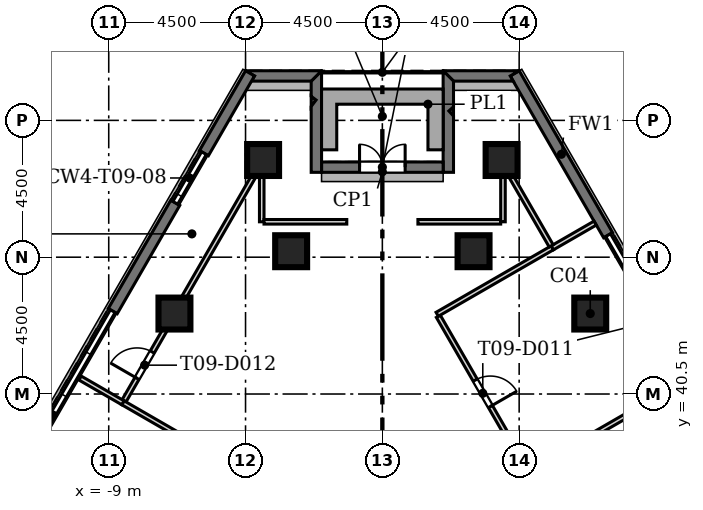
"""IFC4 building model, lengths in metres.
Left out: names, types, materials, properties, quantities, classifications, styles, units other than length and angle.
Written with IfcOpenShell. Run it as: python <this file> out.ifc"""

import sys

from ifc_helpers import new_model, si_unit, direction, frame, frame_2d, origin, origin_2d, place, context, subcontext, project, spatial, polyline, rectangle, outline, extrude, element, fill, save


model = new_model("IFC4")
c1 = context("Model", 3, precision=1e-05, world=origin(), true_north=direction((0.0, 1.0)))
c2 = subcontext(c1, "Body", "Model", "MODEL_VIEW")
j1 = project(units=[si_unit("LENGTHUNIT", "METRE"), si_unit("PLANEANGLEUNIT", "RADIAN")], contexts=[c1])
p1 = place(None, origin())
s1 = spatial("IfcSite", under=j1, at=p1, CompositionType="ELEMENT")
p2 = place(p1, origin())
s2 = spatial("IfcBuilding", under=s1, at=p2, CompositionType="ELEMENT")
p3 = place(p2, frame((0.0, 0.0, 137.5)))
s3 = spatial("IfcBuildingStorey", under=s2, at=p3, CompositionType="ELEMENT", Elevation=137.5)
for number, where, z_axis, x_axis in (
    (1, (6.838, 43.146, 0.0), (0.0, 0.0, 1.0), (1.0, 0.0, 0.0)),
    (2, (3.923, 48.197, 0.0), (0.0, 0.0, 1.0), (1.0, 0.0, 0.0)),
    (3, (3.0, 45.197, 0.0), (0.0, 0.0, 1.0), (1.0, 0.0, 0.0)),
    (4, (-3.0, 45.197, 0.0), (0.0, 0.0, 1.0), (1.0, 0.0, 0.0)),
    (5, (-3.923, 48.197, 0.0), (0.0, 0.0, 1.0), (1.0, 0.0, 0.0)),
    (6, (-6.838, 43.146, 0.0), (0.0, 0.0, 1.0), (1.0, 0.0, 0.0)),
):
    element("IfcColumn", number, at=place(p3, frame(where, z_axis=z_axis, x_axis=x_axis)), inside=s3, PredefinedType="COLUMN", context=c2, shape_type="SweptSolid", body=[
        extrude(rectangle(XDim=1.05, YDim=1.05, at=origin_2d()), origin(), (0.0, 0.0, 1.0), 5.4),
    ])
p4 = place(p3, frame((7.426, 45.724, 0.0), z_axis=(0.0, 0.0, 1.0), x_axis=(-0.500018155671, 0.866014921349, 0.0)))
e7 = element("IfcWall", 7, at=p4, inside=s3, PredefinedType="SOLIDWALL", context=c2, shape_type="SweptSolid", body=[
    extrude(rectangle(XDim=6.146, YDim=0.34, at=frame_2d((3.073, 0.0))), origin(), (0.0, 0.0, 1.0), 5.0),
])
p5 = place(p3, origin())
e8 = element("IfcWall", 8, at=p5, inside=s3, PredefinedType="SOLIDWALL", context=c2, shape_type="SweptSolid", body=[
    extrude(outline(polyline([(1.999, 51.132), (4.501, 51.132), (4.501, 51.132), (4.206, 50.961), (4.305, 50.791), (2.34, 50.791), (1.999, 51.132), (1.999, 51.132)])), origin(), (0.0, 0.0, 1.0), 5.0),
])
p6 = place(p3, origin())
e9 = element("IfcWall", 9, at=p6, inside=s3, PredefinedType="SOLIDWALL", context=c2, shape_type="SweptSolid", body=[
    extrude(outline(polyline([(2.341, 49.642), (2.188, 49.81), (2.341, 49.948), (2.341, 49.642)])), origin(), (0.0, 0.0, 1.0), 4.4),
])
p7 = place(p3, origin())
e10 = element("IfcWall", 10, at=p7, inside=s3, PredefinedType="SOLIDWALL", context=c2, shape_type="SweptSolid", body=[
    extrude(outline(polyline([(2.0, 47.791), (2.0, 51.133), (2.0, 51.133), (2.341, 50.792), (2.341, 49.948), (2.188, 49.81), (2.341, 49.642), (2.341, 47.791), (2.0, 47.791)])), origin(), (0.0, 0.0, 1.0), 5.0),
])
p8 = place(p3, frame((2.0, 47.962, 0.0), z_axis=(0.0, 0.0, 1.0), x_axis=(-1.0, 0.0, 0.0)))
e11 = element("IfcWall", 11, at=p8, inside=s3, PredefinedType="SOLIDWALL", context=c2, shape_type="SweptSolid", body=[
    extrude(rectangle(XDim=4.0, YDim=0.34, at=frame_2d((2.0, 0.0))), origin(), (0.0, 0.0, 1.0), 5.0),
])
p9 = place(p8, frame((1.25, 0.0, 0.0)))
e12 = element("IfcOpeningElement", 12, at=p9, cuts=e11, PredefinedType="OPENING", context=c2, shape_type="SweptSolid", body=[
    extrude(rectangle(XDim=1.5, YDim=2.4, at=frame_2d((0.75, 1.2))), frame((0.0, 0.18, 0.0), z_axis=(0.0, -1.0, 0.0), x_axis=(1.0, 0.0, 0.0)), (0.0, 0.0, 1.0), 0.36),
])
p10 = place(p3, origin())
e13 = element("IfcWall", 13, at=p10, inside=s3, PredefinedType="SOLIDWALL", context=c2, shape_type="SweptSolid", body=[
    extrude(outline(polyline([(-2.341, 50.292), (-2.18, 50.171), (-2.341, 49.959), (-2.341, 50.292)])), origin(), (0.0, 0.0, 1.0), 4.4),
])
p11 = place(p3, origin())
e14 = element("IfcWall", 14, at=p11, inside=s3, PredefinedType="SOLIDWALL", context=c2, shape_type="SweptSolid", body=[
    extrude(outline(polyline([(-2.0, 47.791), (-2.341, 47.791), (-2.341, 49.959), (-2.18, 50.171), (-2.341, 50.292), (-2.341, 50.792), (-2.0, 51.133), (-2.0, 51.133), (-2.0, 47.791)])), origin(), (0.0, 0.0, 1.0), 5.0),
])
p12 = place(p3, origin())
e15 = element("IfcWall", 15, at=p12, inside=s3, PredefinedType="SOLIDWALL", context=c2, shape_type="SweptSolid", body=[
    extrude(outline(polyline([(-4.305, 50.791), (-4.206, 50.961), (-4.501, 51.132), (-4.501, 51.132), (-1.999, 51.132), (-1.999, 51.132), (-2.34, 50.791), (-4.305, 50.791)])), origin(), (0.0, 0.0, 1.0), 5.0),
])
p13 = place(p3, frame((-4.353, 51.047, 0.0), z_axis=(0.0, 0.0, 1.0), x_axis=(-0.499985053252, -0.866034033121, 0.0)))
e16 = element("IfcWall", 16, at=p13, inside=s3, PredefinedType="SOLIDWALL", context=c2, shape_type="SweptSolid", body=[
    extrude(rectangle(XDim=3.031, YDim=0.34, at=frame_2d((1.516, 0.0))), origin(), (0.0, 0.0, 1.0), 5.0),
])
p14 = place(p3, frame((-6.811, 46.789, 0.0), z_axis=(0.0, 0.0, 1.0), x_axis=(-0.499974107589, -0.866040352259, 0.0)))
e17 = element("IfcWall", 17, at=p14, inside=s3, PredefinedType="SOLIDWALL", context=c2, shape_type="SweptSolid", body=[
    extrude(rectangle(XDim=4.115, YDim=0.34, at=frame_2d((2.058, 0.0))), origin(), (0.0, 0.0, 1.0), 5.0),
])
p15 = place(p3, origin())
e18 = element("IfcWall", 18, at=p15, inside=s3, PredefinedType="USERDEFINED", context=c2, shape_type="SweptSolid", body=[
    extrude(outline(polyline([(-1.5, 50.532), (-2.0, 50.532), (-2.0, 50.032), (-2.0, 48.532), (-1.5, 48.532), (-1.5, 50.032), (1.5, 50.032), (1.5, 48.532), (2.0, 48.532), (2.0, 50.032), (2.0, 50.532), (1.5, 50.532), (-1.5, 50.532)])), origin(), (0.0, 0.0, 1.0), 1.1),
])
p16 = place(p3, frame((4.804, 37.925, 0.0), z_axis=(0.0, 0.0, 1.0), x_axis=(0.866031096941, 0.499990139034, 0.0)))
e19 = element("IfcWall", 19, at=p16, inside=s3, PredefinedType="PARTITIONING", context=c2, shape_type="SweptSolid", body=[
    extrude(rectangle(XDim=6.0, YDim=0.15, at=frame_2d((3.0, 0.0))), origin(), (0.0, 0.0, 1.0), 5.0),
])
p17 = place(p3, frame((4.766, 37.99, 0.0), z_axis=(0.0, 0.0, 1.0), x_axis=(-0.500012662943, 0.866018092707, 0.0)))
e20 = element("IfcWall", 20, at=p17, inside=s3, PredefinedType="PARTITIONING", context=c2, shape_type="SweptSolid", body=[
    extrude(rectangle(XDim=5.85, YDim=0.15, at=frame_2d((2.925, 0.0))), origin(), (0.0, 0.0, 1.0), 5.0),
])
p18 = place(p17, frame((2.425, 0.0, 0.0)))
e21 = element("IfcOpeningElement", 21, at=p18, cuts=e20, PredefinedType="OPENING", context=c2, shape_type="SweptSolid", body=[
    extrude(rectangle(XDim=1.0, YDim=2.1, at=frame_2d((0.5, 1.05))), frame((0.0, 0.085, 0.0), z_axis=(0.0, -1.0, 0.0), x_axis=(1.0, 0.0, 0.0)), (0.0, 0.0, 1.0), 0.17),
])
p19 = place(p3, frame((1.804, 43.122, 0.0), z_axis=(0.0, 0.0, 1.0), x_axis=(0.866032173762, 0.499988273872, 0.0)))
e22 = element("IfcWall", 22, at=p19, inside=s3, PredefinedType="PARTITIONING", context=c2, shape_type="SweptSolid", body=[
    extrude(rectangle(XDim=4.373, YDim=0.15, at=frame_2d((2.186, 0.0))), origin(), (0.0, 0.0, 1.0), 5.0),
])
p20 = place(p3, frame((5.591, 45.308, 0.0), z_axis=(0.0, 0.0, 1.0), x_axis=(0.866028203713, 0.499995150351, 0.0)))
e23 = element("IfcWall", 23, at=p20, inside=s3, PredefinedType="PARTITIONING", context=c2, shape_type="SweptSolid", body=[
    extrude(rectangle(XDim=1.627, YDim=0.15, at=frame_2d((0.814, 0.0))), origin(), (0.0, 0.0, 1.0), 5.0),
])
p21 = place(p3, frame((-8.496, 40.276, 0.0), z_axis=(0.0, 0.0, 1.0), x_axis=(0.500037236202, 0.866003904386, 0.0)))
e24 = element("IfcWall", 24, at=p21, inside=s3, PredefinedType="PARTITIONING", context=c2, shape_type="SweptSolid", body=[
    extrude(rectangle(XDim=2.708, YDim=0.15, at=frame_2d((1.354, 0.0))), origin(), (0.0, 0.0, 1.0), 4.2),
])
p22 = place(p21, frame((0.854, 0.0, 0.0)))
e25 = element("IfcOpeningElement", 25, at=p22, cuts=e24, PredefinedType="OPENING", context=c2, shape_type="SweptSolid", body=[
    extrude(rectangle(XDim=1.0, YDim=2.1, at=frame_2d((0.5, 1.05))), frame((0.0, 0.085, 0.0), z_axis=(0.0, -1.0, 0.0), x_axis=(1.0, 0.0, 0.0)), (0.0, 0.0, 1.0), 0.17),
])
p23 = place(p3, frame((-6.535, 43.671, 0.0), z_axis=(0.0, 0.0, 1.0), x_axis=(0.500004591975, 0.86602275259, 0.0)))
e26 = element("IfcWall", 26, at=p23, inside=s3, PredefinedType="PARTITIONING", context=c2, shape_type="SweptSolid", body=[
    extrude(rectangle(XDim=4.619, YDim=0.15, at=frame_2d((2.31, 0.0))), origin(), (0.0, 0.0, 1.0), 4.2),
])
p24 = place(p3, frame((-3.968, 47.672, 0.0), z_axis=(0.0, 0.0, 1.0), x_axis=(0.0, -1.0, 0.0)))
e27 = element("IfcWall", 27, at=p24, inside=s3, PredefinedType="PARTITIONING", context=c2, shape_type="SweptSolid", body=[
    extrude(rectangle(XDim=1.507, YDim=0.15, at=frame_2d((0.754, 0.0))), origin(), (0.0, 0.0, 1.0), 5.0),
])
for number, where, z_axis, x_axis in (
    (28, (-3.893, 46.164, 0.0), (0.0, 0.0, 1.0), (1.0, 0.0, 0.0)),
    (29, (1.17, 46.164, 0.0), (0.0, 0.0, 1.0), (1.0, 0.0, 0.0)),
):
    element("IfcWall", number, at=place(p3, frame(where, z_axis=z_axis, x_axis=x_axis)), inside=s3, PredefinedType="PARTITIONING", context=c2, shape_type="SweptSolid", body=[
        extrude(rectangle(XDim=2.723, YDim=0.15, at=frame_2d((1.361, 0.0))), origin(), (0.0, 0.0, 1.0), 5.0),
    ])
p25 = place(p3, frame((3.968, 46.164, 0.0), z_axis=(0.0, 0.0, 1.0), x_axis=(0.0, 1.0, 0.0)))
e30 = element("IfcWall", 30, at=p25, inside=s3, PredefinedType="PARTITIONING", context=c2, shape_type="SweptSolid", body=[
    extrude(rectangle(XDim=1.507, YDim=0.15, at=frame_2d((0.754, 0.0))), origin(), (0.0, 0.0, 1.0), 5.0),
])
p26 = place(p3, frame((4.226, 47.672, 0.0), z_axis=(0.0, 0.0, 1.0), x_axis=(0.499977226672, -0.866038551572, 0.0)))
e31 = element("IfcWall", 31, at=p26, inside=s3, PredefinedType="PARTITIONING", context=c2, shape_type="SweptSolid", body=[
    extrude(rectangle(XDim=2.654, YDim=0.15, at=frame_2d((1.327, 0.0))), origin(), (0.0, 0.0, 1.0), 4.2),
])
p27 = place(p3, frame((-3.88, 37.525, 0.0), z_axis=(0.0, 0.0, 1.0), x_axis=(-0.866016825791, 0.500014857227, 0.0)))
e32 = element("IfcWall", 32, at=p27, inside=s3, PredefinedType="PARTITIONING", context=c2, shape_type="SweptSolid", body=[
    extrude(rectangle(XDim=5.372, YDim=0.15, at=frame_2d((2.686, 0.0))), origin(), (0.0, 0.0, 1.0), 5.0),
])
p28 = place(p27, frame((2.186, 0.0, 0.0)))
e33 = element("IfcOpeningElement", 33, at=p28, cuts=e32, PredefinedType="OPENING", context=c2, shape_type="SweptSolid", body=[
    extrude(rectangle(XDim=1.0, YDim=2.1, at=frame_2d((0.5, 1.05))), frame((0.0, 0.085, 0.0), z_axis=(0.0, -1.0, 0.0), x_axis=(1.0, 0.0, 0.0)), (0.0, 0.0, 1.0), 0.17),
])
p29 = place(p3, frame((-8.533, 40.211, 0.0), z_axis=(0.0, 0.0, 1.0), x_axis=(-0.866028203713, 0.499995150351, 0.0)))
e34 = element("IfcWall", 34, at=p29, inside=s3, PredefinedType="PARTITIONING", context=c2, shape_type="SweptSolid", body=[
    extrude(rectangle(XDim=1.627, YDim=0.15, at=frame_2d((0.814, 0.0))), origin(), (0.0, 0.0, 1.0), 5.0),
])
p30 = place(p9, frame((1.5, 0.0, 0.0), z_axis=(0.0, 0.0, 1.0), x_axis=(-1.0, 0.0, 0.0)))
e35 = element("IfcDoor", 35, at=p30, inside=s3, OperationType="DOUBLE_DOOR_SINGLE_SWING", PredefinedType="DOOR", context=c2, shape_type="SweptSolid", body=[
    extrude(rectangle(XDim=1.5, YDim=2.4, at=frame_2d((0.75, 1.2))), frame((0.0, 0.025, 0.0), z_axis=(0.0, -1.0, 0.0), x_axis=(1.0, 0.0, 0.0)), (0.0, 0.0, 1.0), 0.05),
])
fill(e12, e35)
p31 = place(p18, frame((1.0, 0.0, 0.0), z_axis=(0.0, 0.0, 1.0), x_axis=(-1.0, 0.0, 0.0)))
e36 = element("IfcDoor", 36, at=p31, inside=s3, OperationType="SINGLE_SWING_RIGHT", PredefinedType="DOOR", context=c2, shape_type="SweptSolid", body=[
    extrude(rectangle(XDim=1.0, YDim=2.1, at=frame_2d((0.5, 1.05))), frame((0.0, 0.025, 0.0), z_axis=(0.0, -1.0, 0.0), x_axis=(1.0, 0.0, 0.0)), (0.0, 0.0, 1.0), 0.05),
])
fill(e21, e36)
p32 = place(p22, origin())
e37 = element("IfcDoor", 37, at=p32, inside=s3, OperationType="SINGLE_SWING_LEFT", PredefinedType="DOOR", context=c2, shape_type="SweptSolid", body=[
    extrude(rectangle(XDim=1.0, YDim=2.1, at=frame_2d((0.5, 1.05))), frame((0.0, 0.025, 0.0), z_axis=(0.0, -1.0, 0.0), x_axis=(1.0, 0.0, 0.0)), (0.0, 0.0, 1.0), 0.05),
])
fill(e25, e37)
save(model, sys.argv[1])
